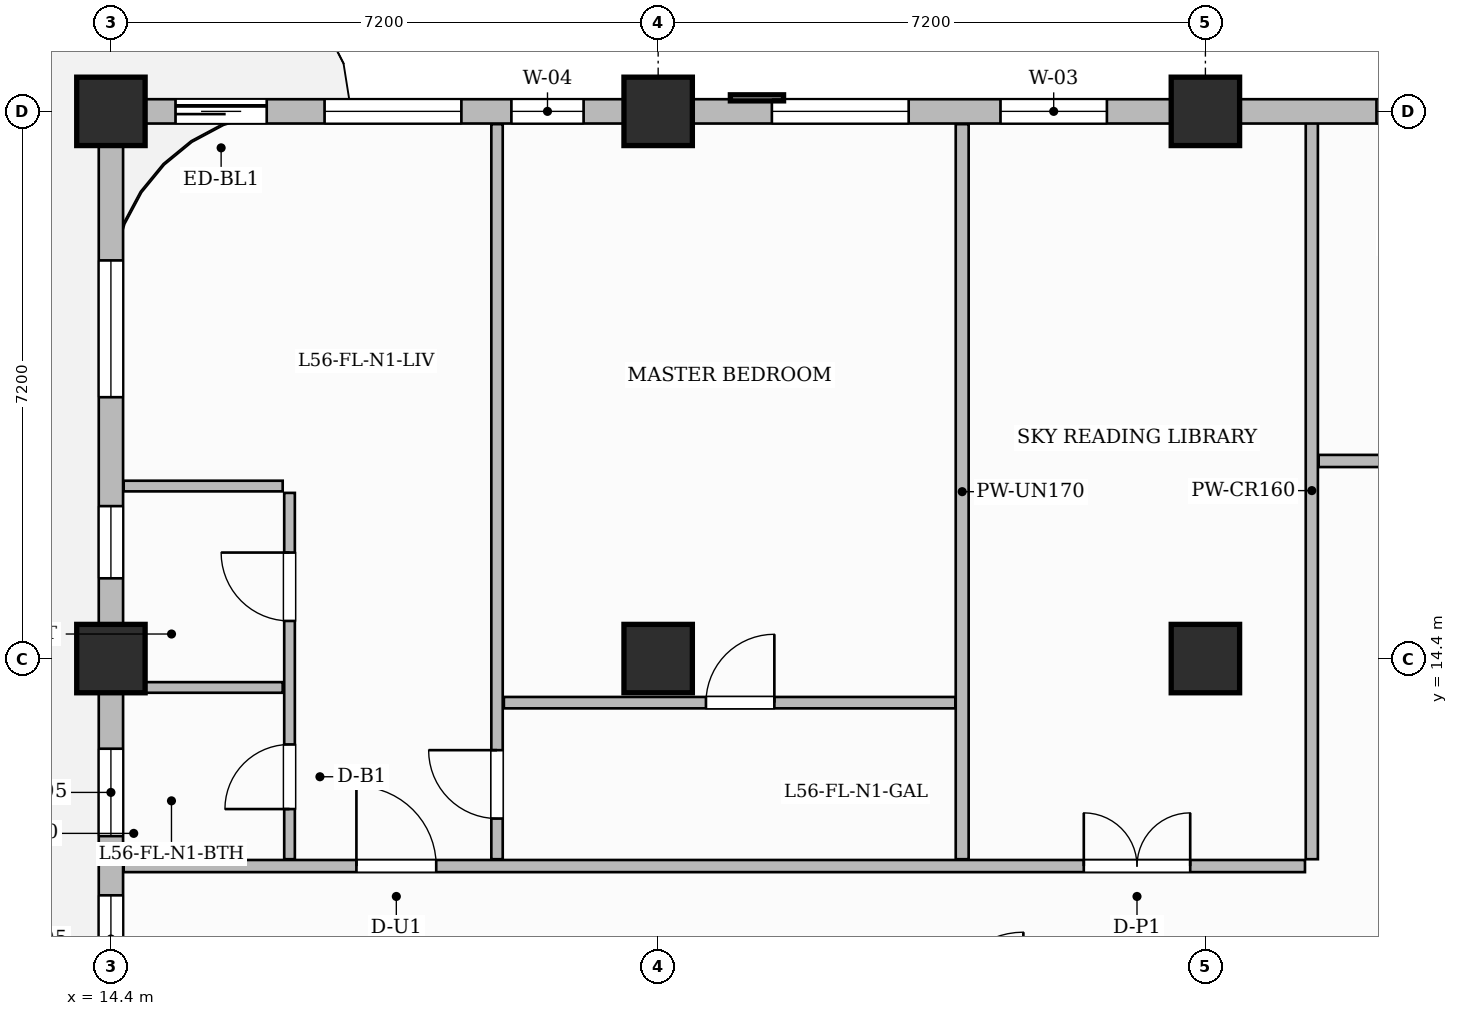
"""IFC4 building model, lengths in metres.
Left out: names, types, materials, properties, quantities, classifications, styles, units other than length and angle.
Written with IfcOpenShell. Run it as: python <this file> out.ifc"""

import sys

from ifc_helpers import new_model, si_unit, direction, frame, frame_2d, origin, origin_2d, place, context, subcontext, project, spatial, rectangle, extrude, source, transform, mapped, element, fill, save


model = new_model("IFC4")
c1 = context("Model", 3, precision=1e-05, world=origin(), true_north=direction((0.0, 1.0)))
c2 = subcontext(c1, "Body", "Model", "MODEL_VIEW")
j1 = project(units=[si_unit("LENGTHUNIT", "METRE"), si_unit("PLANEANGLEUNIT", "RADIAN")], contexts=[c1])
p1 = place(None, origin())
s1 = spatial("IfcSite", under=j1, at=p1, CompositionType="ELEMENT")
p2 = place(p1, origin())
s2 = spatial("IfcBuilding", under=s1, at=p2, CompositionType="ELEMENT")
p3 = place(p2, frame((0.0, 0.0, 225.0)))
s3 = spatial("IfcBuildingStorey", under=s2, at=p3, CompositionType="ELEMENT", Elevation=225.0)
m1 = source(origin(), c2, "Body", "SweptSolid", [
    extrude(rectangle(XDim=0.9, YDim=0.9, at=origin_2d()), origin(), (0.0, 0.0, 1.0), 3.85),
])
for number, where, z_axis, x_axis in (
    (1, (14.4, 14.4, 0.0), (0.0, 0.0, 1.0), (1.0, 0.0, 0.0)),
    (2, (14.4, 21.6, 0.0), (0.0, 0.0, 1.0), (1.0, 0.0, 0.0)),
    (3, (21.6, 14.4, 0.0), (0.0, 0.0, 1.0), (1.0, 0.0, 0.0)),
    (4, (21.6, 21.6, 0.0), (0.0, 0.0, 1.0), (1.0, 0.0, 0.0)),
    (5, (28.8, 14.4, 0.0), (0.0, 0.0, 1.0), (1.0, 0.0, 0.0)),
    (6, (28.8, 21.6, 0.0), (0.0, 0.0, 1.0), (1.0, 0.0, 0.0)),
):
    element("IfcColumn", number, at=place(p3, frame(where, z_axis=z_axis, x_axis=x_axis)), inside=s3, PredefinedType="COLUMN", context=c2, shape_type="MappedRepresentation", body=[
        mapped(m1, transform((0.0, 0.0, 0.0), scale=1.0)),
    ])
p4 = place(p3, frame((14.568, 11.67, 0.0), z_axis=(0.0, 0.0, 1.0), x_axis=(1.0, 0.0, 0.0)))
e7 = element("IfcWall", 7, at=p4, inside=s3, PredefinedType="PARTITIONING", context=c2, shape_type="SweptSolid", body=[
    extrude(rectangle(XDim=15.542, YDim=0.16, at=frame_2d((7.771, 0.0))), origin(), (0.0, 0.0, 1.0), 3.6),
])
p5 = place(p4, frame((3.062, 0.0, 0.0)))
e8 = element("IfcOpeningElement", 8, at=p5, cuts=e7, PredefinedType="OPENING", context=c2, shape_type="SweptSolid", body=[
    extrude(rectangle(XDim=1.05, YDim=2.25, at=frame_2d((0.525, 1.125))), frame((0.0, 0.09, 0.0), z_axis=(0.0, -1.0, 0.0), x_axis=(1.0, 0.0, 0.0)), (0.0, 0.0, 1.0), 0.18),
])
p6 = place(p4, frame((12.632, 0.0, 0.0)))
e9 = element("IfcOpeningElement", 9, at=p6, cuts=e7, PredefinedType="OPENING", context=c2, shape_type="SweptSolid", body=[
    extrude(rectangle(XDim=1.4, YDim=2.35, at=frame_2d((0.7, 1.175))), frame((0.0, 0.09, 0.0), z_axis=(0.0, -1.0, 0.0), x_axis=(1.0, 0.0, 0.0)), (0.0, 0.0, 1.0), 0.18),
])
p7 = place(p3, frame((30.2, 11.76, 0.0), z_axis=(0.0, 0.0, 1.0), x_axis=(0.0, 1.0, 0.0)))
e10 = element("IfcWall", 10, at=p7, inside=s3, PredefinedType="PARTITIONING", context=c2, shape_type="SweptSolid", body=[
    extrude(rectangle(XDim=9.7, YDim=0.16, at=frame_2d((4.85, 0.0))), origin(), (0.0, 0.0, 1.0), 3.6),
])
p8 = place(p3, frame((30.29, 17.0, 0.0), z_axis=(0.0, 0.0, 1.0), x_axis=(1.0, 0.0, 0.0)))
e11 = element("IfcWall", 11, at=p8, inside=s3, PredefinedType="PARTITIONING", context=c2, shape_type="SweptSolid", body=[
    extrude(rectangle(XDim=19.37, YDim=0.16, at=frame_2d((9.685, 0.0))), origin(), (0.0, 0.0, 1.0), 3.6),
])
p9 = place(p8, frame((1.235, 0.0, 0.0)))
e12 = element("IfcOpeningElement", 12, at=p9, cuts=e11, PredefinedType="OPENING", context=c2, shape_type="SweptSolid", body=[
    extrude(rectangle(XDim=0.85, YDim=2.1, at=frame_2d((0.425, 1.05))), frame((0.0, 0.09, 0.0), z_axis=(0.0, -1.0, 0.0), x_axis=(1.0, 0.0, 0.0)), (0.0, 0.0, 1.0), 0.18),
])
p10 = place(p8, frame((7.56, 0.0, 0.0)))
e13 = element("IfcOpeningElement", 13, at=p10, cuts=e11, PredefinedType="OPENING", context=c2, shape_type="SweptSolid", body=[
    extrude(rectangle(XDim=1.4, YDim=2.35, at=frame_2d((0.7, 1.175))), frame((0.0, 0.09, 0.0), z_axis=(0.0, -1.0, 0.0), x_axis=(1.0, 0.0, 0.0)), (0.0, 0.0, 1.0), 0.18),
])
p11 = place(p8, frame((15.785, 0.0, 0.0)))
e14 = element("IfcOpeningElement", 14, at=p11, cuts=e11, PredefinedType="OPENING", context=c2, shape_type="SweptSolid", body=[
    extrude(rectangle(XDim=0.95, YDim=2.15, at=frame_2d((0.475, 1.075))), frame((0.0, 0.09, 0.0), z_axis=(0.0, -1.0, 0.0), x_axis=(1.0, 0.0, 0.0)), (0.0, 0.0, 1.0), 0.18),
])
p12 = place(p3, frame((25.6, 11.76, 0.0), z_axis=(0.0, 0.0, 1.0), x_axis=(0.0, 1.0, 0.0)))
e15 = element("IfcWall", 15, at=p12, inside=s3, PredefinedType="PARTITIONING", context=c2, shape_type="SweptSolid", body=[
    extrude(rectangle(XDim=9.672, YDim=0.17, at=frame_2d((4.836, 0.0))), origin(), (0.0, 0.0, 1.0), 3.6),
])
p13 = place(p3, frame((16.75, 11.76, 0.0), z_axis=(0.0, 0.0, 1.0), x_axis=(0.0, 1.0, 0.0)))
e16 = element("IfcWall", 16, at=p13, inside=s3, PredefinedType="PARTITIONING", context=c2, shape_type="SweptSolid", body=[
    extrude(rectangle(XDim=4.82, YDim=0.14, at=frame_2d((2.41, 0.0))), origin(), (0.0, 0.0, 1.0), 3.6),
])
p14 = place(p13, frame((0.66, 0.0, 0.0)))
e17 = element("IfcOpeningElement", 17, at=p14, cuts=e16, PredefinedType="OPENING", context=c2, shape_type="SweptSolid", body=[
    extrude(rectangle(XDim=0.85, YDim=2.1, at=frame_2d((0.425, 1.05))), frame((0.0, 0.08, 0.0), z_axis=(0.0, -1.0, 0.0), x_axis=(1.0, 0.0, 0.0)), (0.0, 0.0, 1.0), 0.16),
])
p15 = place(p13, frame((3.135, 0.0, 0.0)))
e18 = element("IfcOpeningElement", 18, at=p15, cuts=e16, PredefinedType="OPENING", context=c2, shape_type="SweptSolid", body=[
    extrude(rectangle(XDim=0.9, YDim=2.15, at=frame_2d((0.45, 1.075))), frame((0.0, 0.08, 0.0), z_axis=(0.0, -1.0, 0.0), x_axis=(1.0, 0.0, 0.0)), (0.0, 0.0, 1.0), 0.16),
])
p16 = place(p3, frame((14.59, 14.02, 0.0), z_axis=(0.0, 0.0, 1.0), x_axis=(1.0, 0.0, 0.0)))
e19 = element("IfcWall", 19, at=p16, inside=s3, PredefinedType="PARTITIONING", context=c2, shape_type="SweptSolid", body=[
    extrude(rectangle(XDim=2.07, YDim=0.14, at=frame_2d((1.035, 0.0))), origin(), (0.0, 0.0, 1.0), 3.6),
])
p17 = place(p3, frame((14.568, 16.67, 0.0), z_axis=(0.0, 0.0, 1.0), x_axis=(1.0, 0.0, 0.0)))
e20 = element("IfcWall", 20, at=p17, inside=s3, PredefinedType="PARTITIONING", context=c2, shape_type="SweptSolid", body=[
    extrude(rectangle(XDim=2.092, YDim=0.14, at=frame_2d((1.046, 0.0))), origin(), (0.0, 0.0, 1.0), 3.6),
])
p18 = place(p3, frame((19.48, 11.76, 0.0), z_axis=(0.0, 0.0, 1.0), x_axis=(0.0, 1.0, 0.0)))
e21 = element("IfcWall", 21, at=p18, inside=s3, PredefinedType="PARTITIONING", context=c2, shape_type="SweptSolid", body=[
    extrude(rectangle(XDim=9.672, YDim=0.15, at=frame_2d((4.836, 0.0))), origin(), (0.0, 0.0, 1.0), 3.6),
])
p19 = place(p18, frame((0.535, 0.0, 0.0)))
e22 = element("IfcOpeningElement", 22, at=p19, cuts=e21, PredefinedType="OPENING", context=c2, shape_type="SweptSolid", body=[
    extrude(rectangle(XDim=0.9, YDim=2.15, at=frame_2d((0.45, 1.075))), frame((0.0, 0.085, 0.0), z_axis=(0.0, -1.0, 0.0), x_axis=(1.0, 0.0, 0.0)), (0.0, 0.0, 1.0), 0.17),
])
p20 = place(p3, frame((19.57, 13.82, 0.0), z_axis=(0.0, 0.0, 1.0), x_axis=(1.0, 0.0, 0.0)))
e23 = element("IfcWall", 23, at=p20, inside=s3, PredefinedType="PARTITIONING", context=c2, shape_type="SweptSolid", body=[
    extrude(rectangle(XDim=5.94, YDim=0.15, at=frame_2d((2.97, 0.0))), origin(), (0.0, 0.0, 1.0), 3.6),
])
p21 = place(p20, frame((2.659, 0.0, 0.0)))
e24 = element("IfcOpeningElement", 24, at=p21, cuts=e23, PredefinedType="OPENING", context=c2, shape_type="SweptSolid", body=[
    extrude(rectangle(XDim=0.9, YDim=2.15, at=frame_2d((0.45, 1.075))), frame((0.0, 0.085, 0.0), z_axis=(0.0, -1.0, 0.0), x_axis=(1.0, 0.0, 0.0)), (0.0, 0.0, 1.0), 0.17),
])
p22 = place(p3, frame((14.4, 21.6, 0.0), z_axis=(0.0, 0.0, 1.0), x_axis=(1.0, 0.0, 0.0)))
e25 = element("IfcWall", 25, at=p22, inside=s3, PredefinedType="SOLIDWALL", context=c2, shape_type="SweptSolid", body=[
    extrude(rectangle(XDim=35.4, YDim=0.32, at=frame_2d((17.7, 0.0))), origin(), (0.0, 0.0, 1.0), 3.135),
])
p23 = place(p22, frame((0.85, 0.0, 0.0)))
e26 = element("IfcOpeningElement", 26, at=p23, cuts=e25, PredefinedType="OPENING", context=c2, shape_type="SweptSolid", body=[
    extrude(rectangle(XDim=1.2, YDim=2.2, at=frame_2d((0.6, 1.1))), frame((0.0, 0.17, 0.0), z_axis=(0.0, -1.0, 0.0), x_axis=(1.0, 0.0, 0.0)), (0.0, 0.0, 1.0), 0.34),
])
p24 = place(p22, frame((2.811, 0.0, 0.8)))
e27 = element("IfcOpeningElement", 27, at=p24, cuts=e25, PredefinedType="OPENING", context=c2, shape_type="SweptSolid", body=[
    extrude(rectangle(XDim=1.8, YDim=1.85, at=frame_2d((0.9, 0.925))), frame((0.0, 0.17, 0.0), z_axis=(0.0, -1.0, 0.0), x_axis=(1.0, 0.0, 0.0)), (0.0, 0.0, 1.0), 0.34),
])
p25 = place(p22, frame((5.269, 0.0, 0.8)))
e28 = element("IfcOpeningElement", 28, at=p25, cuts=e25, PredefinedType="OPENING", context=c2, shape_type="SweptSolid", body=[
    extrude(rectangle(XDim=0.95, YDim=1.75, at=frame_2d((0.475, 0.875))), frame((0.0, 0.17, 0.0), z_axis=(0.0, -1.0, 0.0), x_axis=(1.0, 0.0, 0.0)), (0.0, 0.0, 1.0), 0.34),
])
p26 = place(p22, frame((8.696, 0.0, 0.8)))
e29 = element("IfcOpeningElement", 29, at=p26, cuts=e25, PredefinedType="OPENING", context=c2, shape_type="SweptSolid", body=[
    extrude(rectangle(XDim=1.8, YDim=1.85, at=frame_2d((0.9, 0.925))), frame((0.0, 0.17, 0.0), z_axis=(0.0, -1.0, 0.0), x_axis=(1.0, 0.0, 0.0)), (0.0, 0.0, 1.0), 0.34),
])
p27 = place(p22, frame((11.704, 0.0, 0.8)))
e30 = element("IfcOpeningElement", 30, at=p27, cuts=e25, PredefinedType="OPENING", context=c2, shape_type="SweptSolid", body=[
    extrude(rectangle(XDim=1.4, YDim=1.85, at=frame_2d((0.7, 0.925))), frame((0.0, 0.17, 0.0), z_axis=(0.0, -1.0, 0.0), x_axis=(1.0, 0.0, 0.0)), (0.0, 0.0, 1.0), 0.34),
])
p28 = place(p22, frame((16.651, 0.0, 0.8)))
e31 = element("IfcOpeningElement", 31, at=p28, cuts=e25, PredefinedType="OPENING", context=c2, shape_type="SweptSolid", body=[
    extrude(rectangle(XDim=1.8, YDim=1.85, at=frame_2d((0.9, 0.925))), frame((0.0, 0.17, 0.0), z_axis=(0.0, -1.0, 0.0), x_axis=(1.0, 0.0, 0.0)), (0.0, 0.0, 1.0), 0.34),
])
p29 = place(p22, frame((21.725, 0.0, 0.8)))
e32 = element("IfcOpeningElement", 32, at=p29, cuts=e25, PredefinedType="OPENING", context=c2, shape_type="SweptSolid", body=[
    extrude(rectangle(XDim=1.8, YDim=1.85, at=frame_2d((0.9, 0.925))), frame((0.0, 0.17, 0.0), z_axis=(0.0, -1.0, 0.0), x_axis=(1.0, 0.0, 0.0)), (0.0, 0.0, 1.0), 0.34),
])
p30 = place(p22, frame((24.475, 0.0, 0.8)))
e33 = element("IfcOpeningElement", 33, at=p30, cuts=e25, PredefinedType="OPENING", context=c2, shape_type="SweptSolid", body=[
    extrude(rectangle(XDim=1.8, YDim=1.85, at=frame_2d((0.9, 0.925))), frame((0.0, 0.17, 0.0), z_axis=(0.0, -1.0, 0.0), x_axis=(1.0, 0.0, 0.0)), (0.0, 0.0, 1.0), 0.34),
])
p31 = place(p22, frame((29.531, 0.0, 0.8)))
e34 = element("IfcOpeningElement", 34, at=p31, cuts=e25, PredefinedType="OPENING", context=c2, shape_type="SweptSolid", body=[
    extrude(rectangle(XDim=1.8, YDim=1.85, at=frame_2d((0.9, 0.925))), frame((0.0, 0.17, 0.0), z_axis=(0.0, -1.0, 0.0), x_axis=(1.0, 0.0, 0.0)), (0.0, 0.0, 1.0), 0.34),
])
p32 = place(p22, frame((32.277, 0.0, 0.8)))
e35 = element("IfcOpeningElement", 35, at=p32, cuts=e25, PredefinedType="OPENING", context=c2, shape_type="SweptSolid", body=[
    extrude(rectangle(XDim=1.8, YDim=1.85, at=frame_2d((0.9, 0.925))), frame((0.0, 0.17, 0.0), z_axis=(0.0, -1.0, 0.0), x_axis=(1.0, 0.0, 0.0)), (0.0, 0.0, 1.0), 0.34),
])
p33 = place(p3, frame((14.4, 0.05, 0.0), z_axis=(0.0, 0.0, 1.0), x_axis=(0.0, 1.0, 0.0)))
e36 = element("IfcWall", 36, at=p33, inside=s3, PredefinedType="SOLIDWALL", context=c2, shape_type="SweptSolid", body=[
    extrude(rectangle(XDim=21.5, YDim=0.32, at=frame_2d((10.75, 0.0))), origin(), (0.0, 0.0, 1.0), 3.135),
])
p34 = place(p33, frame((1.275, 0.0, 0.8)))
e37 = element("IfcOpeningElement", 37, at=p34, cuts=e36, PredefinedType="OPENING", context=c2, shape_type="SweptSolid", body=[
    extrude(rectangle(XDim=1.8, YDim=1.85, at=frame_2d((0.9, 0.925))), frame((0.0, 0.17, 0.0), z_axis=(0.0, -1.0, 0.0), x_axis=(1.0, 0.0, 0.0)), (0.0, 0.0, 1.0), 0.34),
])
p35 = place(p33, frame((4.025, 0.0, 0.8)))
e38 = element("IfcOpeningElement", 38, at=p35, cuts=e36, PredefinedType="OPENING", context=c2, shape_type="SweptSolid", body=[
    extrude(rectangle(XDim=1.8, YDim=1.85, at=frame_2d((0.9, 0.925))), frame((0.0, 0.17, 0.0), z_axis=(0.0, -1.0, 0.0), x_axis=(1.0, 0.0, 0.0)), (0.0, 0.0, 1.0), 0.34),
])
p36 = place(p33, frame((8.246, 0.0, 0.8)))
e39 = element("IfcOpeningElement", 39, at=p36, cuts=e36, PredefinedType="OPENING", context=c2, shape_type="SweptSolid", body=[
    extrude(rectangle(XDim=1.15, YDim=1.8, at=frame_2d((0.575, 0.9))), frame((0.0, 0.17, 0.0), z_axis=(0.0, -1.0, 0.0), x_axis=(1.0, 0.0, 0.0)), (0.0, 0.0, 1.0), 0.34),
])
p37 = place(p33, frame((10.085, 0.0, 0.8)))
e40 = element("IfcOpeningElement", 40, at=p37, cuts=e36, PredefinedType="OPENING", context=c2, shape_type="SweptSolid", body=[
    extrude(rectangle(XDim=1.15, YDim=1.8, at=frame_2d((0.575, 0.9))), frame((0.0, 0.17, 0.0), z_axis=(0.0, -1.0, 0.0), x_axis=(1.0, 0.0, 0.0)), (0.0, 0.0, 1.0), 0.34),
])
p38 = place(p33, frame((12.014, 0.0, 0.8)))
e41 = element("IfcOpeningElement", 41, at=p38, cuts=e36, PredefinedType="OPENING", context=c2, shape_type="SweptSolid", body=[
    extrude(rectangle(XDim=1.15, YDim=1.8, at=frame_2d((0.575, 0.9))), frame((0.0, 0.17, 0.0), z_axis=(0.0, -1.0, 0.0), x_axis=(1.0, 0.0, 0.0)), (0.0, 0.0, 1.0), 0.34),
])
p39 = place(p33, frame((15.406, 0.0, 0.8)))
e42 = element("IfcOpeningElement", 42, at=p39, cuts=e36, PredefinedType="OPENING", context=c2, shape_type="SweptSolid", body=[
    extrude(rectangle(XDim=0.95, YDim=1.75, at=frame_2d((0.475, 0.875))), frame((0.0, 0.17, 0.0), z_axis=(0.0, -1.0, 0.0), x_axis=(1.0, 0.0, 0.0)), (0.0, 0.0, 1.0), 0.34),
])
p40 = place(p33, frame((17.789, 0.0, 0.8)))
e43 = element("IfcOpeningElement", 43, at=p40, cuts=e36, PredefinedType="OPENING", context=c2, shape_type="SweptSolid", body=[
    extrude(rectangle(XDim=1.8, YDim=1.85, at=frame_2d((0.9, 0.925))), frame((0.0, 0.17, 0.0), z_axis=(0.0, -1.0, 0.0), x_axis=(1.0, 0.0, 0.0)), (0.0, 0.0, 1.0), 0.34),
])
m2 = source(origin(), c2, "Body", "SweptSolid", [
    extrude(rectangle(XDim=0.85, YDim=2.1, at=frame_2d((0.425, 1.05))), frame((0.0, 0.025, 0.0), z_axis=(0.0, -1.0, 0.0), x_axis=(1.0, 0.0, 0.0)), (0.0, 0.0, 1.0), 0.05),
])
p41 = place(p14, origin())
e44 = element("IfcDoor", 44, at=p41, inside=s3, OperationType="SINGLE_SWING_LEFT", PredefinedType="DOOR", context=c2, shape_type="MappedRepresentation", body=[
    mapped(m2, transform((0.0, 0.0, 0.0), scale=1.0)),
])
fill(e17, e44)
m3 = source(origin(), c2, "Body", "SweptSolid", [
    extrude(rectangle(XDim=0.9, YDim=2.15, at=frame_2d((0.45, 1.075))), frame((0.0, 0.025, 0.0), z_axis=(0.0, -1.0, 0.0), x_axis=(1.0, 0.0, 0.0)), (0.0, 0.0, 1.0), 0.05),
])
p42 = place(p15, origin())
e45 = element("IfcDoor", 45, at=p42, inside=s3, OperationType="SINGLE_SWING_RIGHT", PredefinedType="DOOR", context=c2, shape_type="MappedRepresentation", body=[
    mapped(m3, transform((0.0, 0.0, 0.0), scale=1.0)),
])
fill(e18, e45)
m4 = source(origin(), c2, "Body", "SweptSolid", [
    extrude(rectangle(XDim=1.05, YDim=2.25, at=frame_2d((0.525, 1.125))), frame((0.0, 0.025, 0.0), z_axis=(0.0, -1.0, 0.0), x_axis=(1.0, 0.0, 0.0)), (0.0, 0.0, 1.0), 0.05),
])
p43 = place(p5, origin())
e46 = element("IfcDoor", 46, at=p43, inside=s3, OperationType="SINGLE_SWING_LEFT", PredefinedType="DOOR", context=c2, shape_type="MappedRepresentation", body=[
    mapped(m4, transform((0.0, 0.0, 0.0), scale=1.0)),
])
fill(e8, e46)
p44 = place(p19, origin())
e47 = element("IfcDoor", 47, at=p44, inside=s3, OperationType="SINGLE_SWING_RIGHT", PredefinedType="DOOR", context=c2, shape_type="MappedRepresentation", body=[
    mapped(m3, transform((0.0, 0.0, 0.0), scale=1.0)),
])
fill(e22, e47)
p45 = place(p21, origin())
e48 = element("IfcDoor", 48, at=p45, inside=s3, OperationType="SINGLE_SWING_RIGHT", PredefinedType="DOOR", context=c2, shape_type="MappedRepresentation", body=[
    mapped(m3, transform((0.0, 0.0, 0.0), scale=1.0)),
])
fill(e24, e48)
m5 = source(origin(), c2, "Body", "SweptSolid", [
    extrude(rectangle(XDim=1.4, YDim=2.35, at=frame_2d((0.7, 1.175))), frame((0.0, 0.025, 0.0), z_axis=(0.0, -1.0, 0.0), x_axis=(1.0, 0.0, 0.0)), (0.0, 0.0, 1.0), 0.05),
])
p46 = place(p6, origin())
e49 = element("IfcDoor", 49, at=p46, inside=s3, OperationType="DOUBLE_DOOR_SINGLE_SWING", PredefinedType="DOOR", context=c2, shape_type="MappedRepresentation", body=[
    mapped(m5, transform((0.0, 0.0, 0.0), scale=1.0)),
])
fill(e9, e49)
m6 = source(origin(), c2, "Body", "SweptSolid", [
    extrude(rectangle(XDim=1.2, YDim=2.2, at=frame_2d((0.6, 1.1))), frame((0.0, 0.025, 0.0), z_axis=(0.0, -1.0, 0.0), x_axis=(1.0, 0.0, 0.0)), (0.0, 0.0, 1.0), 0.05),
])
p47 = place(p23, origin())
e50 = element("IfcDoor", 50, at=p47, inside=s3, OperationType="SLIDING_TO_LEFT", PredefinedType="DOOR", context=c2, shape_type="MappedRepresentation", body=[
    mapped(m6, transform((0.0, 0.0, 0.0), scale=1.0)),
])
fill(e26, e50)
m7 = source(origin(), c2, "Body", "SweptSolid", [
    extrude(rectangle(XDim=1.8, YDim=1.85, at=frame_2d((0.9, 0.925))), frame((0.0, 0.03, 0.0), z_axis=(0.0, -1.0, 0.0), x_axis=(1.0, 0.0, 0.0)), (0.0, 0.0, 1.0), 0.06),
])
p48 = place(p24, origin())
e51 = element("IfcWindow", 51, at=p48, inside=s3, PartitioningType="DOUBLE_PANEL_VERTICAL", PredefinedType="WINDOW", context=c2, shape_type="MappedRepresentation", body=[
    mapped(m7, transform((0.0, 0.0, 0.0), scale=1.0)),
])
fill(e27, e51)
m8 = source(origin(), c2, "Body", "SweptSolid", [
    extrude(rectangle(XDim=0.95, YDim=1.75, at=frame_2d((0.475, 0.875))), frame((0.0, 0.03, 0.0), z_axis=(0.0, -1.0, 0.0), x_axis=(1.0, 0.0, 0.0)), (0.0, 0.0, 1.0), 0.06),
])
p49 = place(p25, origin())
e52 = element("IfcWindow", 52, at=p49, inside=s3, PartitioningType="SINGLE_PANEL", PredefinedType="WINDOW", context=c2, shape_type="MappedRepresentation", body=[
    mapped(m8, transform((0.0, 0.0, 0.0), scale=1.0)),
])
fill(e28, e52)
p50 = place(p26, origin())
e53 = element("IfcWindow", 53, at=p50, inside=s3, PartitioningType="DOUBLE_PANEL_VERTICAL", PredefinedType="WINDOW", context=c2, shape_type="MappedRepresentation", body=[
    mapped(m7, transform((0.0, 0.0, 0.0), scale=1.0)),
])
fill(e29, e53)
m9 = source(origin(), c2, "Body", "SweptSolid", [
    extrude(rectangle(XDim=1.4, YDim=1.85, at=frame_2d((0.7, 0.925))), frame((0.0, 0.03, 0.0), z_axis=(0.0, -1.0, 0.0), x_axis=(1.0, 0.0, 0.0)), (0.0, 0.0, 1.0), 0.06),
])
p51 = place(p27, origin())
e54 = element("IfcWindow", 54, at=p51, inside=s3, PartitioningType="SINGLE_PANEL", PredefinedType="WINDOW", context=c2, shape_type="MappedRepresentation", body=[
    mapped(m9, transform((0.0, 0.0, 0.0), scale=1.0)),
])
fill(e30, e54)
p52 = place(p28, origin())
e55 = element("IfcWindow", 55, at=p52, inside=s3, PartitioningType="DOUBLE_PANEL_VERTICAL", PredefinedType="WINDOW", context=c2, shape_type="MappedRepresentation", body=[
    mapped(m7, transform((0.0, 0.0, 0.0), scale=1.0)),
])
fill(e31, e55)
m10 = source(origin(), c2, "Body", "SweptSolid", [
    extrude(rectangle(XDim=1.15, YDim=1.8, at=frame_2d((0.575, 0.9))), frame((0.0, 0.03, 0.0), z_axis=(0.0, -1.0, 0.0), x_axis=(1.0, 0.0, 0.0)), (0.0, 0.0, 1.0), 0.06),
])
p53 = place(p37, origin())
e56 = element("IfcWindow", 56, at=p53, inside=s3, PartitioningType="SINGLE_PANEL", PredefinedType="WINDOW", context=c2, shape_type="MappedRepresentation", body=[
    mapped(m10, transform((0.0, 0.0, 0.0), scale=1.0)),
])
fill(e40, e56)
p54 = place(p38, origin())
e57 = element("IfcWindow", 57, at=p54, inside=s3, PartitioningType="SINGLE_PANEL", PredefinedType="WINDOW", context=c2, shape_type="MappedRepresentation", body=[
    mapped(m10, transform((0.0, 0.0, 0.0), scale=1.0)),
])
fill(e41, e57)
p55 = place(p39, origin())
e58 = element("IfcWindow", 58, at=p55, inside=s3, PartitioningType="SINGLE_PANEL", PredefinedType="WINDOW", context=c2, shape_type="MappedRepresentation", body=[
    mapped(m8, transform((0.0, 0.0, 0.0), scale=1.0)),
])
fill(e42, e58)
p56 = place(p40, origin())
e59 = element("IfcWindow", 59, at=p56, inside=s3, PartitioningType="DOUBLE_PANEL_VERTICAL", PredefinedType="WINDOW", context=c2, shape_type="MappedRepresentation", body=[
    mapped(m7, transform((0.0, 0.0, 0.0), scale=1.0)),
])
fill(e43, e59)
save(model, sys.argv[1])
